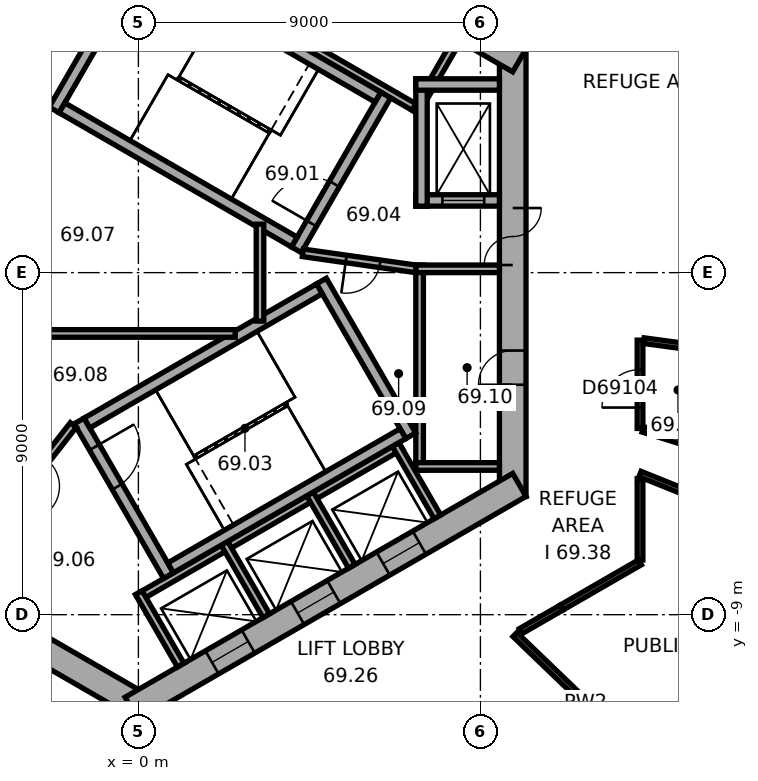
"""IFC4 building model, lengths in metres.
Left out: names, types, materials, properties, quantities, classifications, styles, units other than length and angle.
Written with IfcOpenShell. Run it as: python <this file> out.ifc"""

import sys

from ifc_helpers import new_model, si_unit, direction, frame, frame_2d, origin, place, context, subcontext, project, spatial, rectangle, extrude, element, fill, save


model = new_model("IFC4")
c1 = context("Model", 3, precision=1e-05, world=origin(), true_north=direction((0.0, 1.0)))
c2 = subcontext(c1, "Body", "Model", "MODEL_VIEW")
j1 = project(units=[si_unit("LENGTHUNIT", "METRE"), si_unit("PLANEANGLEUNIT", "RADIAN")], contexts=[c1])
p1 = place(None, origin())
s1 = spatial("IfcSite", under=j1, at=p1, CompositionType="ELEMENT")
p2 = place(p1, origin())
s2 = spatial("IfcBuilding", under=s1, at=p2, CompositionType="ELEMENT")
p3 = place(p2, frame((0.0, 0.0, 278.3)))
s3 = spatial("IfcBuildingStorey", under=s2, at=p3, CompositionType="ELEMENT", Elevation=278.3)
p4 = place(p3, frame((9.85, -5.889, 0.0), z_axis=(0.0, 0.0, 1.0), x_axis=(0.0, 1.0, 0.0)))
e1 = element("IfcWall", 1, at=p4, inside=s3, PredefinedType="SHEAR", context=c2, shape_type="SweptSolid", body=[
    extrude(rectangle(XDim=11.778, YDim=0.7, at=frame_2d((5.889, 0.0))), origin(), (0.0, 0.0, 1.0), 7.4),
])
p5 = place(p4, frame((6.089, 0.0, 0.0)))
e2 = element("IfcOpeningElement", 2, at=p5, cuts=e1, PredefinedType="OPENING", context=c2, shape_type="SweptSolid", body=[
    extrude(rectangle(XDim=1.5, YDim=2.1, at=frame_2d((0.75, 1.05))), frame((0.0, 0.36, 0.0), z_axis=(0.0, -1.0, 0.0), x_axis=(1.0, 0.0, 0.0)), (0.0, 0.0, 1.0), 0.72),
])
p6 = place(p4, frame((2.939, 0.0, 0.0)))
e3 = element("IfcOpeningElement", 3, at=p6, cuts=e1, PredefinedType="OPENING", context=c2, shape_type="SweptSolid", body=[
    extrude(rectangle(XDim=0.9, YDim=2.1, at=frame_2d((0.45, 1.05))), frame((0.0, 0.36, 0.0), z_axis=(0.0, -1.0, 0.0), x_axis=(1.0, 0.0, 0.0)), (0.0, 0.0, 1.0), 0.72),
])
p7 = place(p3, frame((10.025, 5.586, 0.0), z_axis=(0.0, 0.0, 1.0), x_axis=(-0.866026453023, 0.499998182661, 0.0)))
e4 = element("IfcWall", 4, at=p7, inside=s3, PredefinedType="SHEAR", context=c2, shape_type="SweptSolid", body=[
    extrude(rectangle(XDim=11.778, YDim=0.7, at=frame_2d((5.889, 0.0))), origin(), (0.0, 0.0, 1.0), 7.4),
])
p8 = place(p7, frame((5.139, 0.0, 0.0)))
e5 = element("IfcOpeningElement", 5, at=p8, cuts=e4, PredefinedType="OPENING", context=c2, shape_type="SweptSolid", body=[
    extrude(rectangle(XDim=0.9, YDim=2.1, at=frame_2d((0.45, 1.05))), frame((0.0, 0.36, 0.0), z_axis=(0.0, -1.0, 0.0), x_axis=(1.0, 0.0, 0.0)), (0.0, 0.0, 1.0), 0.72),
])
p9 = place(p3, frame((0.175, 11.475, 0.0), z_axis=(0.0, 0.0, 1.0), x_axis=(-0.866026453023, -0.499998182661, 0.0)))
e6 = element("IfcWall", 6, at=p9, inside=s3, PredefinedType="SHEAR", context=c2, shape_type="SweptSolid", body=[
    extrude(rectangle(XDim=11.778, YDim=0.7, at=frame_2d((5.889, 0.0))), origin(), (0.0, 0.0, 1.0), 7.4),
])
p10 = place(p9, frame((6.089, 0.0, 0.0)))
e7 = element("IfcOpeningElement", 7, at=p10, cuts=e6, PredefinedType="OPENING", context=c2, shape_type="SweptSolid", body=[
    extrude(rectangle(XDim=1.5, YDim=2.1, at=frame_2d((0.75, 1.05))), frame((0.0, 0.36, 0.0), z_axis=(0.0, -1.0, 0.0), x_axis=(1.0, 0.0, 0.0)), (0.0, 0.0, 1.0), 0.72),
])
p11 = place(p9, frame((1.639, 0.0, 0.0)))
e8 = element("IfcOpeningElement", 8, at=p11, cuts=e6, PredefinedType="OPENING", context=c2, shape_type="SweptSolid", body=[
    extrude(rectangle(XDim=0.9, YDim=2.1, at=frame_2d((0.45, 1.05))), frame((0.0, 0.36, 0.0), z_axis=(0.0, -1.0, 0.0), x_axis=(1.0, 0.0, 0.0)), (0.0, 0.0, 1.0), 0.72),
])
p12 = place(p9, frame((4.239, 0.0, 0.0)))
e9 = element("IfcOpeningElement", 9, at=p12, cuts=e6, PredefinedType="OPENING", context=c2, shape_type="SweptSolid", body=[
    extrude(rectangle(XDim=0.9, YDim=2.1, at=frame_2d((0.45, 1.05))), frame((0.0, 0.36, 0.0), z_axis=(0.0, -1.0, 0.0), x_axis=(1.0, 0.0, 0.0)), (0.0, 0.0, 1.0), 0.72),
])
p13 = place(p3, frame((-10.025, -5.586, 0.0), z_axis=(0.0, 0.0, 1.0), x_axis=(0.866026453023, -0.499998182661, 0.0)))
e10 = element("IfcWall", 10, at=p13, inside=s3, PredefinedType="SHEAR", context=c2, shape_type="SweptSolid", body=[
    extrude(rectangle(XDim=11.778, YDim=0.7, at=frame_2d((5.889, 0.0))), origin(), (0.0, 0.0, 1.0), 7.4),
])
p14 = place(p13, frame((6.089, 0.0, 0.0)))
e11 = element("IfcOpeningElement", 11, at=p14, cuts=e10, PredefinedType="OPENING", context=c2, shape_type="SweptSolid", body=[
    extrude(rectangle(XDim=1.5, YDim=2.1, at=frame_2d((0.75, 1.05))), frame((0.0, 0.36, 0.0), z_axis=(0.0, -1.0, 0.0), x_axis=(1.0, 0.0, 0.0)), (0.0, 0.0, 1.0), 0.72),
])
p15 = place(p13, frame((1.539, 0.0, 0.0)))
e12 = element("IfcOpeningElement", 12, at=p15, cuts=e10, PredefinedType="OPENING", context=c2, shape_type="SweptSolid", body=[
    extrude(rectangle(XDim=1.1, YDim=2.1, at=frame_2d((0.55, 1.05))), frame((0.0, 0.36, 0.0), z_axis=(0.0, -1.0, 0.0), x_axis=(1.0, 0.0, 0.0)), (0.0, 0.0, 1.0), 0.72),
])
p16 = place(p13, frame((4.139, 0.0, 0.0)))
e13 = element("IfcOpeningElement", 13, at=p16, cuts=e10, PredefinedType="OPENING", context=c2, shape_type="SweptSolid", body=[
    extrude(rectangle(XDim=1.1, YDim=2.1, at=frame_2d((0.55, 1.05))), frame((0.0, 0.36, 0.0), z_axis=(0.0, -1.0, 0.0), x_axis=(1.0, 0.0, 0.0)), (0.0, 0.0, 1.0), 0.72),
])
p17 = place(p3, frame((-0.175, -11.475, 0.0), z_axis=(0.0, 0.0, 1.0), x_axis=(0.866026453023, 0.499998182661, 0.0)))
e14 = element("IfcWall", 14, at=p17, inside=s3, PredefinedType="SHEAR", context=c2, shape_type="SweptSolid", body=[
    extrude(rectangle(XDim=11.778, YDim=0.7, at=frame_2d((5.889, 0.0))), origin(), (0.0, 0.0, 1.0), 7.4),
])
p18 = place(p17, frame((2.439, 0.0, 0.0)))
e15 = element("IfcOpeningElement", 15, at=p18, cuts=e14, PredefinedType="OPENING", context=c2, shape_type="SweptSolid", body=[
    extrude(rectangle(XDim=1.1, YDim=2.1, at=frame_2d((0.55, 1.05))), frame((0.0, 0.36, 0.0), z_axis=(0.0, -1.0, 0.0), x_axis=(1.0, 0.0, 0.0)), (0.0, 0.0, 1.0), 0.72),
])
p19 = place(p17, frame((5.039, 0.0, 0.0)))
e16 = element("IfcOpeningElement", 16, at=p19, cuts=e14, PredefinedType="OPENING", context=c2, shape_type="SweptSolid", body=[
    extrude(rectangle(XDim=1.1, YDim=2.1, at=frame_2d((0.55, 1.05))), frame((0.0, 0.36, 0.0), z_axis=(0.0, -1.0, 0.0), x_axis=(1.0, 0.0, 0.0)), (0.0, 0.0, 1.0), 0.72),
])
p20 = place(p17, frame((7.639, 0.0, 0.0)))
e17 = element("IfcOpeningElement", 17, at=p20, cuts=e14, PredefinedType="OPENING", context=c2, shape_type="SweptSolid", body=[
    extrude(rectangle(XDim=1.1, YDim=2.1, at=frame_2d((0.55, 1.05))), frame((0.0, 0.36, 0.0), z_axis=(0.0, -1.0, 0.0), x_axis=(1.0, 0.0, 0.0)), (0.0, 0.0, 1.0), 0.72),
])
p21 = place(p3, frame((7.4, -5.2, 0.0), z_axis=(0.0, 0.0, 1.0), x_axis=(0.0, 1.0, 0.0)))
e18 = element("IfcWall", 18, at=p21, inside=s3, PredefinedType="PARTITIONING", context=c2, shape_type="SweptSolid", body=[
    extrude(rectangle(XDim=5.4, YDim=0.2, at=frame_2d((2.7, 0.0))), origin(), (0.0, 0.0, 1.0), 7.12),
])
for number, where, z_axis, x_axis in (
    (19, (7.3, -5.1, 0.0), (0.0, 0.0, 1.0), (1.0, 0.0, 0.0)),
    (20, (7.3, 0.1, 0.0), (0.0, 0.0, 1.0), (1.0, 0.0, 0.0)),
):
    element("IfcWall", number, at=place(p3, frame(where, z_axis=z_axis, x_axis=x_axis)), inside=s3, PredefinedType="PARTITIONING", context=c2, shape_type="SweptSolid", body=[
        extrude(rectangle(XDim=2.2, YDim=0.2, at=frame_2d((1.1, 0.0))), origin(), (0.0, 0.0, 1.0), 7.12),
    ])
p22 = place(p3, frame((7.424, 4.259, 0.0), z_axis=(0.0, 0.0, 1.0), x_axis=(-0.866026010844, 0.49999894854, 0.0)))
e21 = element("IfcWall", 21, at=p22, inside=s3, PredefinedType="PARTITIONING", context=c2, shape_type="SweptSolid", body=[
    extrude(rectangle(XDim=8.0, YDim=0.2, at=frame_2d((4.0, 0.0))), origin(), (0.0, 0.0, 1.0), 7.12),
])
p23 = place(p3, frame((7.287, 4.222, 0.0), z_axis=(0.0, 0.0, 1.0), x_axis=(0.499946605688, 0.86605622881, 0.0)))
e22 = element("IfcWall", 22, at=p23, inside=s3, PredefinedType="PARTITIONING", context=c2, shape_type="SweptSolid", body=[
    extrude(rectangle(XDim=2.2, YDim=0.2, at=frame_2d((1.1, 0.0))), origin(), (0.0, 0.0, 1.0), 7.12),
])
p24 = place(p3, frame((-0.024, -8.559, 0.0), z_axis=(0.0, 0.0, 1.0), x_axis=(0.866026010844, 0.49999894854, 0.0)))
e23 = element("IfcWall", 23, at=p24, inside=s3, PredefinedType="PARTITIONING", context=c2, shape_type="SweptSolid", body=[
    extrude(rectangle(XDim=8.0, YDim=0.2, at=frame_2d((4.0, 0.0))), origin(), (0.0, 0.0, 1.0), 7.12),
])
for number, where, z_axis, x_axis in (
    (24, (0.013, -8.422, 0.0), (0.0, 0.0, 1.0), (0.5, -0.866, 0.0)),
    (25, (2.264, -7.122, 0.0), (0.0, 0.0, 1.0), (0.5, -0.866, 0.0)),
    (26, (4.516, -5.822, 0.0), (0.0, 0.0, 1.0), (0.5, -0.866, 0.0)),
    (27, (6.768, -4.522, 0.0), (0.0, 0.0, 1.0), (0.5, -0.866, 0.0)),
):
    element("IfcWall", number, at=place(p3, frame(where, z_axis=z_axis, x_axis=x_axis)), inside=s3, PredefinedType="PARTITIONING", context=c2, shape_type="SweptSolid", body=[
        extrude(rectangle(XDim=2.2, YDim=0.2, at=frame_2d((1.1, 0.0))), origin(), (0.0, 0.0, 1.0), 7.12),
    ])
p25 = place(p3, frame((4.158, 0.602, 0.0), z_axis=(0.0, 0.0, 1.0), x_axis=(0.499977259774, 0.866038532462, 0.0)))
e28 = element("IfcWall", 28, at=p25, inside=s3, PredefinedType="SHEAR", context=c2, shape_type="SweptSolid", body=[
    extrude(rectangle(XDim=4.7, YDim=0.3, at=frame_2d((2.35, 0.0))), origin(), (0.0, 0.0, 1.0), 7.12),
])
p26 = place(p25, frame((0.8, 0.0, 0.0)))
e29 = element("IfcOpeningElement", 29, at=p26, cuts=e28, PredefinedType="OPENING", context=c2, shape_type="SweptSolid", body=[
    extrude(rectangle(XDim=1.2, YDim=2.1, at=frame_2d((0.6, 1.05))), frame((0.0, 0.16, 0.0), z_axis=(0.0, -1.0, 0.0), x_axis=(1.0, 0.0, 0.0)), (0.0, 0.0, 1.0), 0.32),
])
p27 = place(p3, frame((-2.216, 4.282, 0.0), z_axis=(0.0, 0.0, 1.0), x_axis=(0.499977259774, 0.866038532462, 0.0)))
e30 = element("IfcWall", 30, at=p27, inside=s3, PredefinedType="SHEAR", context=c2, shape_type="SweptSolid", body=[
    extrude(rectangle(XDim=4.7, YDim=0.3, at=frame_2d((2.35, 0.0))), origin(), (0.0, 0.0, 1.0), 7.12),
])
for number, where, z_axis, x_axis in (
    (31, (4.103, 0.807, 0.0), (0.0, 0.0, 1.0), (-0.866, 0.5, 0.0)),
    (32, (6.303, 4.617, 0.0), (0.0, 0.0, 1.0), (-0.866, 0.5, 0.0)),
):
    element("IfcWall", number, at=place(p3, frame(where, z_axis=z_axis, x_axis=x_axis)), inside=s3, PredefinedType="SHEAR", context=c2, shape_type="SweptSolid", body=[
        extrude(rectangle(XDim=7.06, YDim=0.3, at=frame_2d((3.53, 0.0))), origin(), (0.0, 0.0, 1.0), 7.12),
    ])
p28 = place(p3, frame((-1.558, -3.902, 0.0), z_axis=(0.0, 0.0, 1.0), x_axis=(0.499977259774, -0.866038532462, 0.0)))
e33 = element("IfcWall", 33, at=p28, inside=s3, PredefinedType="SHEAR", context=c2, shape_type="SweptSolid", body=[
    extrude(rectangle(XDim=4.7, YDim=0.3, at=frame_2d((2.35, 0.0))), origin(), (0.0, 0.0, 1.0), 7.12),
])
p29 = place(p28, frame((0.8, 0.0, 0.0)))
e34 = element("IfcOpeningElement", 34, at=p29, cuts=e33, PredefinedType="OPENING", context=c2, shape_type="SweptSolid", body=[
    extrude(rectangle(XDim=1.2, YDim=2.1, at=frame_2d((0.6, 1.05))), frame((0.0, 0.16, 0.0), z_axis=(0.0, -1.0, 0.0), x_axis=(1.0, 0.0, 0.0)), (0.0, 0.0, 1.0), 0.32),
])
p30 = place(p3, frame((4.816, -0.222, 0.0), z_axis=(0.0, 0.0, 1.0), x_axis=(0.499977259774, -0.866038532462, 0.0)))
e35 = element("IfcWall", 35, at=p30, inside=s3, PredefinedType="SHEAR", context=c2, shape_type="SweptSolid", body=[
    extrude(rectangle(XDim=4.7, YDim=0.3, at=frame_2d((2.35, 0.0))), origin(), (0.0, 0.0, 1.0), 7.12),
])
for number, where, z_axis, x_axis in (
    (36, (-1.353, -3.957, 0.0), (0.0, 0.0, 1.0), (0.866, 0.5, 0.0)),
    (37, (0.847, -7.767, 0.0), (0.0, 0.0, 1.0), (0.866, 0.5, 0.0)),
):
    element("IfcWall", number, at=place(p3, frame(where, z_axis=z_axis, x_axis=x_axis)), inside=s3, PredefinedType="SHEAR", context=c2, shape_type="SweptSolid", body=[
        extrude(rectangle(XDim=7.06, YDim=0.3, at=frame_2d((3.53, 0.0))), origin(), (0.0, 0.0, 1.0), 7.12),
    ])
p31 = place(p3, frame((7.3, 1.9, 0.0), z_axis=(0.0, 0.0, 1.0), x_axis=(1.0, 0.0, 0.0)))
e38 = element("IfcWall", 38, at=p31, inside=s3, PredefinedType="SHEAR", context=c2, shape_type="SweptSolid", body=[
    extrude(rectangle(XDim=2.2, YDim=0.3, at=frame_2d((1.1, 0.0))), origin(), (0.0, 0.0, 1.0), 7.12),
])
p32 = place(p31, frame((0.7, 0.0, 0.0)))
e39 = element("IfcOpeningElement", 39, at=p32, cuts=e38, PredefinedType="OPENING", context=c2, shape_type="SweptSolid", body=[
    extrude(rectangle(XDim=1.1, YDim=2.1, at=frame_2d((0.55, 1.05))), frame((0.0, 0.16, 0.0), z_axis=(0.0, -1.0, 0.0), x_axis=(1.0, 0.0, 0.0)), (0.0, 0.0, 1.0), 0.32),
])
p33 = place(p3, frame((7.45, 1.75, 0.0), z_axis=(0.0, 0.0, 1.0), x_axis=(0.0, 1.0, 0.0)))
e40 = element("IfcWall", 40, at=p33, inside=s3, PredefinedType="SHEAR", context=c2, shape_type="SweptSolid", body=[
    extrude(rectangle(XDim=3.35, YDim=0.3, at=frame_2d((1.675, 0.0))), origin(), (0.0, 0.0, 1.0), 7.12),
])
p34 = place(p3, frame((7.3, 4.95, 0.0), z_axis=(0.0, 0.0, 1.0), x_axis=(1.0, 0.0, 0.0)))
e41 = element("IfcWall", 41, at=p34, inside=s3, PredefinedType="SHEAR", context=c2, shape_type="SweptSolid", body=[
    extrude(rectangle(XDim=2.2, YDim=0.3, at=frame_2d((1.1, 0.0))), origin(), (0.0, 0.0, 1.0), 7.12),
])
p35 = place(p3, frame((4.327, 0.521, 0.0), z_axis=(0.0, 0.0, 1.0), x_axis=(0.990124376366, -0.14019172346, 0.0)))
e42 = element("IfcWall", 42, at=p35, inside=s3, PredefinedType="PARTITIONING", context=c2, shape_type="SweptSolid", body=[
    extrude(rectangle(XDim=3.002, YDim=0.2, at=frame_2d((1.501, 0.0))), origin(), (0.0, 0.0, 1.0), 7.12),
])
p36 = place(p35, frame((1.15, 0.0, 0.0)))
e43 = element("IfcOpeningElement", 43, at=p36, cuts=e42, PredefinedType="OPENING", context=c2, shape_type="SweptSolid", body=[
    extrude(rectangle(XDim=0.9, YDim=2.1, at=frame_2d((0.45, 1.05))), frame((0.0, 0.11, 0.0), z_axis=(0.0, -1.0, 0.0), x_axis=(1.0, 0.0, 0.0)), (0.0, 0.0, 1.0), 0.22),
])
p37 = place(p3, frame((-1.712, -4.008, 0.0), z_axis=(0.0, 0.0, 1.0), x_axis=(-0.616549420702, -0.787316208287, 0.0)))
e44 = element("IfcWall", 44, at=p37, inside=s3, PredefinedType="PARTITIONING", context=c2, shape_type="SweptSolid", body=[
    extrude(rectangle(XDim=3.002, YDim=0.2, at=frame_2d((1.501, 0.0))), origin(), (0.0, 0.0, 1.0), 7.12),
])
p38 = place(p37, frame((1.15, 0.0, 0.0)))
e45 = element("IfcOpeningElement", 45, at=p38, cuts=e44, PredefinedType="OPENING", context=c2, shape_type="SweptSolid", body=[
    extrude(rectangle(XDim=0.9, YDim=2.1, at=frame_2d((0.45, 1.05))), frame((0.0, 0.11, 0.0), z_axis=(0.0, -1.0, 0.0), x_axis=(1.0, 0.0, 0.0)), (0.0, 0.0, 1.0), 0.22),
])
p39 = place(p3, frame((-2.72, -1.6, 0.0), z_axis=(0.0, 0.0, 1.0), x_axis=(1.0, 0.0, 0.0)))
e46 = element("IfcWall", 46, at=p39, inside=s3, PredefinedType="PARTITIONING", context=c2, shape_type="SweptSolid", body=[
    extrude(rectangle(XDim=5.269, YDim=0.2, at=frame_2d((2.634, 0.0))), origin(), (0.0, 0.0, 1.0), 7.12),
])
p40 = place(p3, frame((3.2, -1.275, 0.0), z_axis=(0.0, 0.0, 1.0), x_axis=(0.0, 1.0, 0.0)))
e47 = element("IfcWall", 47, at=p40, inside=s3, PredefinedType="PARTITIONING", context=c2, shape_type="SweptSolid", body=[
    extrude(rectangle(XDim=2.549, YDim=0.2, at=frame_2d((1.275, 0.0))), origin(), (0.0, 0.0, 1.0), 7.12),
])
p41 = place(p3, frame((13.633, -13.102, 0.0), z_axis=(0.0, 0.0, 1.0), x_axis=(-0.721024625755, 0.692909437845, 0.0)))
e48 = element("IfcWall", 48, at=p41, inside=s3, PredefinedType="PARTITIONING", context=c2, shape_type="SweptSolid", body=[
    extrude(rectangle(XDim=5.167, YDim=0.15, at=frame_2d((2.583, 0.0))), origin(), (0.0, 0.0, 1.0), 6.57),
])
p42 = place(p3, frame((11.127, -8.817, 0.0), z_axis=(0.0, 0.0, 1.0), x_axis=(-0.866020046725, -0.500009278584, 0.0)))
e49 = element("IfcWall", 49, at=p42, inside=s3, PredefinedType="PARTITIONING", context=c2, shape_type="SweptSolid", body=[
    extrude(rectangle(XDim=1.228, YDim=0.15, at=frame_2d((0.614, 0.0))), origin(), (0.0, 0.0, 1.0), 7.12),
])
p43 = place(p3, frame((11.127, -8.817, 0.0), z_axis=(0.0, 0.0, 1.0), x_axis=(0.866075162418, 0.499913805613, 0.0)))
e50 = element("IfcWall", 50, at=p43, inside=s3, PredefinedType="PARTITIONING", context=c2, shape_type="SweptSolid", body=[
    extrude(rectangle(XDim=2.393, YDim=0.15, at=frame_2d((1.197, 0.0))), origin(), (0.0, 0.0, 1.0), 7.12),
])
p44 = place(p3, frame((13.2, -7.561, 0.0), z_axis=(0.0, 0.0, 1.0), x_axis=(0.0, 1.0, 0.0)))
e51 = element("IfcWall", 51, at=p44, inside=s3, PredefinedType="PARTITIONING", context=c2, shape_type="SweptSolid", body=[
    extrude(rectangle(XDim=2.143, YDim=0.15, at=frame_2d((1.071, 0.0))), origin(), (0.0, 0.0, 1.0), 7.12),
])
p45 = place(p3, frame((13.2, -5.299, 0.0), z_axis=(0.0, 0.0, 1.0), x_axis=(0.928023609597, -0.372521381977, 0.0)))
e52 = element("IfcWall", 52, at=p45, inside=s3, PredefinedType="PARTITIONING", context=c2, shape_type="SweptSolid", body=[
    extrude(rectangle(XDim=5.657, YDim=0.15, at=frame_2d((2.829, 0.0))), origin(), (0.0, 0.0, 1.0), 6.57),
])
p46 = place(p45, frame((4.357, 0.0, 0.0)))
e53 = element("IfcOpeningElement", 53, at=p46, cuts=e52, PredefinedType="OPENING", context=c2, shape_type="SweptSolid", body=[
    extrude(rectangle(XDim=1.0, YDim=2.1, at=frame_2d((0.5, 1.05))), frame((0.0, 0.085, 0.0), z_axis=(0.0, -1.0, 0.0), x_axis=(1.0, 0.0, 0.0)), (0.0, 0.0, 1.0), 0.17),
])
p47 = place(p3, frame((15.104, -4.691, 0.0), z_axis=(0.0, 0.0, 1.0), x_axis=(-0.955023043559, 0.296531594054, 0.0)))
e54 = element("IfcWall", 54, at=p47, inside=s3, PredefinedType="PARTITIONING", context=c2, shape_type="SweptSolid", body=[
    extrude(rectangle(XDim=1.914, YDim=0.15, at=frame_2d((0.957, 0.0))), origin(), (0.0, 0.0, 1.0), 7.12),
])
p48 = place(p3, frame((13.2, -4.1, 0.0), z_axis=(0.0, 0.0, 1.0), x_axis=(0.0, 1.0, 0.0)))
e55 = element("IfcWall", 55, at=p48, inside=s3, PredefinedType="PARTITIONING", context=c2, shape_type="SweptSolid", body=[
    extrude(rectangle(XDim=2.324, YDim=0.15, at=frame_2d((1.162, 0.0))), origin(), (0.0, 0.0, 1.0), 7.12),
])
p49 = place(p48, frame((0.55, 0.0, 0.0)))
e56 = element("IfcOpeningElement", 56, at=p49, cuts=e55, PredefinedType="OPENING", context=c2, shape_type="SweptSolid", body=[
    extrude(rectangle(XDim=1.0, YDim=2.1, at=frame_2d((0.5, 1.05))), frame((0.0, 0.085, 0.0), z_axis=(0.0, -1.0, 0.0), x_axis=(1.0, 0.0, 0.0)), (0.0, 0.0, 1.0), 0.17),
])
p50 = place(p3, frame((13.299, -1.789, 0.0), z_axis=(0.0, 0.0, 1.0), x_axis=(0.991045767705, -0.133522606001, 0.0)))
e57 = element("IfcWall", 57, at=p50, inside=s3, PredefinedType="PARTITIONING", context=c2, shape_type="SweptSolid", body=[
    extrude(rectangle(XDim=1.918, YDim=0.15, at=frame_2d((0.959, 0.0))), origin(), (0.0, 0.0, 1.0), 7.12),
])
p51 = place(p5, origin())
e58 = element("IfcDoor", 58, at=p51, inside=s3, OperationType="DOUBLE_DOOR_SINGLE_SWING", PredefinedType="DOOR", context=c2, shape_type="SweptSolid", body=[
    extrude(rectangle(XDim=1.5, YDim=2.1, at=frame_2d((0.75, 1.05))), frame((0.0, 0.025, 0.0), z_axis=(0.0, -1.0, 0.0), x_axis=(1.0, 0.0, 0.0)), (0.0, 0.0, 1.0), 0.05),
])
fill(e2, e58)
p52 = place(p26, origin())
e59 = element("IfcDoor", 59, at=p52, inside=s3, OperationType="SINGLE_SWING_RIGHT", PredefinedType="DOOR", context=c2, shape_type="SweptSolid", body=[
    extrude(rectangle(XDim=1.2, YDim=2.1, at=frame_2d((0.6, 1.05))), frame((0.0, 0.025, 0.0), z_axis=(0.0, -1.0, 0.0), x_axis=(1.0, 0.0, 0.0)), (0.0, 0.0, 1.0), 0.05),
])
fill(e29, e59)
p53 = place(p29, origin())
e60 = element("IfcDoor", 60, at=p53, inside=s3, OperationType="SINGLE_SWING_RIGHT", PredefinedType="DOOR", context=c2, shape_type="SweptSolid", body=[
    extrude(rectangle(XDim=1.2, YDim=2.1, at=frame_2d((0.6, 1.05))), frame((0.0, 0.025, 0.0), z_axis=(0.0, -1.0, 0.0), x_axis=(1.0, 0.0, 0.0)), (0.0, 0.0, 1.0), 0.05),
])
fill(e34, e60)
p54 = place(p36, origin())
e61 = element("IfcDoor", 61, at=p54, inside=s3, OperationType="SINGLE_SWING_LEFT", PredefinedType="DOOR", context=c2, shape_type="SweptSolid", body=[
    extrude(rectangle(XDim=0.9, YDim=2.1, at=frame_2d((0.45, 1.05))), frame((0.0, 0.025, 0.0), z_axis=(0.0, -1.0, 0.0), x_axis=(1.0, 0.0, 0.0)), (0.0, 0.0, 1.0), 0.05),
])
fill(e43, e61)
p55 = place(p6, origin())
e62 = element("IfcDoor", 62, at=p55, inside=s3, OperationType="SINGLE_SWING_LEFT", PredefinedType="DOOR", context=c2, shape_type="SweptSolid", body=[
    extrude(rectangle(XDim=0.9, YDim=2.1, at=frame_2d((0.45, 1.05))), frame((0.0, 0.025, 0.0), z_axis=(0.0, -1.0, 0.0), x_axis=(1.0, 0.0, 0.0)), (0.0, 0.0, 1.0), 0.05),
])
fill(e3, e62)
p56 = place(p32, origin())
e63 = element("IfcDoor", 63, at=p56, inside=s3, OperationType="DOUBLE_DOOR_SLIDING", PredefinedType="DOOR", context=c2, shape_type="SweptSolid", body=[
    extrude(rectangle(XDim=1.1, YDim=2.1, at=frame_2d((0.55, 1.05))), frame((0.0, 0.025, 0.0), z_axis=(0.0, -1.0, 0.0), x_axis=(1.0, 0.0, 0.0)), (0.0, 0.0, 1.0), 0.05),
])
fill(e39, e63)
p57 = place(p18, origin())
e64 = element("IfcDoor", 64, at=p57, inside=s3, OperationType="DOUBLE_DOOR_SLIDING", PredefinedType="DOOR", context=c2, shape_type="SweptSolid", body=[
    extrude(rectangle(XDim=1.1, YDim=2.1, at=frame_2d((0.55, 1.05))), frame((0.0, 0.025, 0.0), z_axis=(0.0, -1.0, 0.0), x_axis=(1.0, 0.0, 0.0)), (0.0, 0.0, 1.0), 0.05),
])
fill(e15, e64)
p58 = place(p19, origin())
e65 = element("IfcDoor", 65, at=p58, inside=s3, OperationType="DOUBLE_DOOR_SLIDING", PredefinedType="DOOR", context=c2, shape_type="SweptSolid", body=[
    extrude(rectangle(XDim=1.1, YDim=2.1, at=frame_2d((0.55, 1.05))), frame((0.0, 0.025, 0.0), z_axis=(0.0, -1.0, 0.0), x_axis=(1.0, 0.0, 0.0)), (0.0, 0.0, 1.0), 0.05),
])
fill(e16, e65)
p59 = place(p20, origin())
e66 = element("IfcDoor", 66, at=p59, inside=s3, OperationType="DOUBLE_DOOR_SLIDING", PredefinedType="DOOR", context=c2, shape_type="SweptSolid", body=[
    extrude(rectangle(XDim=1.1, YDim=2.1, at=frame_2d((0.55, 1.05))), frame((0.0, 0.025, 0.0), z_axis=(0.0, -1.0, 0.0), x_axis=(1.0, 0.0, 0.0)), (0.0, 0.0, 1.0), 0.05),
])
fill(e17, e66)
p60 = place(p49, origin())
e67 = element("IfcDoor", 67, at=p60, inside=s3, OperationType="SINGLE_SWING_LEFT", PredefinedType="DOOR", context=c2, shape_type="SweptSolid", body=[
    extrude(rectangle(XDim=1.0, YDim=2.1, at=frame_2d((0.5, 1.05))), frame((0.0, 0.025, 0.0), z_axis=(0.0, -1.0, 0.0), x_axis=(1.0, 0.0, 0.0)), (0.0, 0.0, 1.0), 0.05),
])
fill(e56, e67)
save(model, sys.argv[1])
